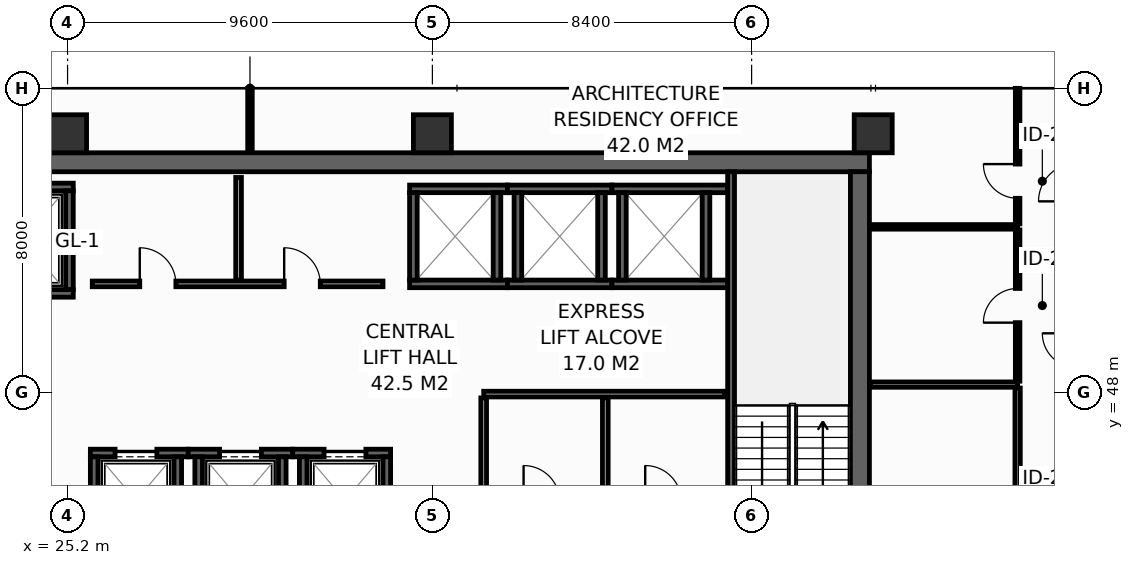
"""IFC4 building model, lengths in metres.
Left out: names, types, materials, properties, quantities, classifications, styles, units other than length and angle.
Written with IfcOpenShell. Run it as: python <this file> out.ifc"""

import sys

from ifc_helpers import new_model, si_unit, direction, frame, frame_2d, origin, origin_2d, place, context, subcontext, project, spatial, rectangle, hollow_rectangle, extrude, element, fill, save


model = new_model("IFC4")
c1 = context("Model", 3, precision=1e-05, world=origin(), true_north=direction((0.0, 1.0)))
c2 = subcontext(c1, "Body", "Model", "MODEL_VIEW")
j1 = project(units=[si_unit("LENGTHUNIT", "METRE"), si_unit("PLANEANGLEUNIT", "RADIAN")], contexts=[c1])
p1 = place(None, origin())
s1 = spatial("IfcSite", under=j1, at=p1, CompositionType="ELEMENT")
p2 = place(p1, origin())
s2 = spatial("IfcBuilding", under=s1, at=p2, CompositionType="ELEMENT")
p3 = place(p2, frame((0.0, 0.0, 163.8)))
s3 = spatial("IfcBuildingStorey", under=s2, at=p3, CompositionType="ELEMENT", Elevation=163.8)
p4 = place(p3, frame((13.6, 54.05, 0.0), z_axis=(0.0, 0.0, 1.0), x_axis=(1.0, 0.0, 0.0)))
e1 = element("IfcWall", 1, at=p4, inside=s3, PredefinedType="SHEAR", context=c2, shape_type="SweptSolid", body=[
    extrude(rectangle(XDim=32.7, YDim=0.5, at=frame_2d((16.35, 0.0))), origin(), (0.0, 0.0, 1.0), 3.55),
])
p5 = place(p3, frame((46.05, 43.4, 0.0), z_axis=(0.0, 0.0, 1.0), x_axis=(0.0, 1.0, 0.0)))
e2 = element("IfcWall", 2, at=p5, inside=s3, PredefinedType="SHEAR", context=c2, shape_type="SweptSolid", body=[
    extrude(rectangle(XDim=10.4, YDim=0.5, at=frame_2d((5.2, 0.0))), origin(), (0.0, 0.0, 1.0), 3.55),
])
for number, where, z_axis, x_axis in (
    (3, (25.2, 54.8, 0.0), (0.0, 0.0, 1.0), (1.0, 0.0, 0.0)),
    (4, (34.8, 54.8, 0.0), (0.0, 0.0, 1.0), (1.0, 0.0, 0.0)),
    (5, (46.4, 54.8, 0.0), (0.0, 0.0, 1.0), (1.0, 0.0, 0.0)),
):
    element("IfcColumn", number, at=place(p3, frame(where, z_axis=z_axis, x_axis=x_axis)), inside=s3, PredefinedType="COLUMN", context=c2, shape_type="SweptSolid", body=[
        extrude(hollow_rectangle(XDim=1.0, YDim=1.0, WallThickness=0.045, at=origin_2d()), origin(), (0.0, 0.0, 1.0), 3.8),
    ])
p6 = place(p3, frame((22.5, 50.6, 0.0), z_axis=(0.0, 0.0, 1.0), x_axis=(1.0, 0.0, 0.0)))
e6 = element("IfcWall", 6, at=p6, inside=s3, PredefinedType="SHEAR", context=c2, shape_type="SweptSolid", body=[
    extrude(rectangle(XDim=2.85, YDim=0.2, at=frame_2d((1.425, 0.0))), origin(), (0.0, 0.0, 1.0), 3.55),
])
p7 = place(p6, frame((0.925, 0.0, 0.0)))
e7 = element("IfcOpeningElement", 7, at=p7, cuts=e6, PredefinedType="OPENING", context=c2, shape_type="SweptSolid", body=[
    extrude(rectangle(XDim=1.25, YDim=2.3, at=frame_2d((0.625, 1.15))), frame((0.0, 0.11, 0.0), z_axis=(0.0, -1.0, 0.0), x_axis=(1.0, 0.0, 0.0)), (0.0, 0.0, 1.0), 0.22),
])
p8 = place(p3, frame((22.5, 53.4, 0.0), z_axis=(0.0, 0.0, 1.0), x_axis=(1.0, 0.0, 0.0)))
e8 = element("IfcWall", 8, at=p8, inside=s3, PredefinedType="SHEAR", context=c2, shape_type="SweptSolid", body=[
    extrude(rectangle(XDim=2.85, YDim=0.2, at=frame_2d((1.425, 0.0))), origin(), (0.0, 0.0, 1.0), 3.55),
])
p9 = place(p3, frame((25.25, 50.7, 0.0), z_axis=(0.0, 0.0, 1.0), x_axis=(0.0, 1.0, 0.0)))
e9 = element("IfcWall", 9, at=p9, inside=s3, PredefinedType="SHEAR", context=c2, shape_type="SweptSolid", body=[
    extrude(rectangle(XDim=2.6, YDim=0.2, at=frame_2d((1.3, 0.0))), origin(), (0.0, 0.0, 1.0), 3.55),
])
p10 = place(p3, frame((25.8, 46.4, 0.0), z_axis=(0.0, 0.0, 1.0), x_axis=(1.0, 0.0, 0.0)))
e10 = element("IfcWall", 10, at=p10, inside=s3, PredefinedType="SHEAR", context=c2, shape_type="SweptSolid", body=[
    extrude(rectangle(XDim=2.575, YDim=0.2, at=frame_2d((1.288, 0.0))), origin(), (0.0, 0.0, 1.0), 3.55),
])
p11 = place(p10, frame((0.65, 0.0, 0.0)))
e11 = element("IfcOpeningElement", 11, at=p11, cuts=e10, PredefinedType="OPENING", context=c2, shape_type="SweptSolid", body=[
    extrude(rectangle(XDim=1.1, YDim=2.2, at=frame_2d((0.55, 1.1))), frame((0.0, 0.11, 0.0), z_axis=(0.0, -1.0, 0.0), x_axis=(1.0, 0.0, 0.0)), (0.0, 0.0, 1.0), 0.22),
])
for number, where, z_axis, x_axis in (
    (12, (25.9, 44.0, 0.0), (0.0, 0.0, 1.0), (0.0, 1.0, 0.0)),
    (13, (28.1, 44.0, 0.0), (0.0, 0.0, 1.0), (0.0, 1.0, 0.0)),
):
    element("IfcWall", number, at=place(p3, frame(where, z_axis=z_axis, x_axis=x_axis)), inside=s3, PredefinedType="SHEAR", context=c2, shape_type="SweptSolid", body=[
        extrude(rectangle(XDim=2.3, YDim=0.2, at=frame_2d((1.15, 0.0))), origin(), (0.0, 0.0, 1.0), 3.55),
    ])
p12 = place(p3, frame((28.375, 46.4, 0.0), z_axis=(0.0, 0.0, 1.0), x_axis=(1.0, 0.0, 0.0)))
e14 = element("IfcWall", 14, at=p12, inside=s3, PredefinedType="SHEAR", context=c2, shape_type="SweptSolid", body=[
    extrude(rectangle(XDim=2.75, YDim=0.2, at=frame_2d((1.375, 0.0))), origin(), (0.0, 0.0, 1.0), 3.55),
])
p13 = place(p12, frame((0.825, 0.0, 0.0)))
e15 = element("IfcOpeningElement", 15, at=p13, cuts=e14, PredefinedType="OPENING", context=c2, shape_type="SweptSolid", body=[
    extrude(rectangle(XDim=1.1, YDim=2.2, at=frame_2d((0.55, 1.1))), frame((0.0, 0.11, 0.0), z_axis=(0.0, -1.0, 0.0), x_axis=(1.0, 0.0, 0.0)), (0.0, 0.0, 1.0), 0.22),
])
for number, where, z_axis, x_axis in (
    (16, (28.65, 44.0, 0.0), (0.0, 0.0, 1.0), (0.0, 1.0, 0.0)),
    (17, (30.85, 44.0, 0.0), (0.0, 0.0, 1.0), (0.0, 1.0, 0.0)),
):
    element("IfcWall", number, at=place(p3, frame(where, z_axis=z_axis, x_axis=x_axis)), inside=s3, PredefinedType="SHEAR", context=c2, shape_type="SweptSolid", body=[
        extrude(rectangle(XDim=2.3, YDim=0.2, at=frame_2d((1.15, 0.0))), origin(), (0.0, 0.0, 1.0), 3.55),
    ])
p14 = place(p3, frame((31.125, 46.4, 0.0), z_axis=(0.0, 0.0, 1.0), x_axis=(1.0, 0.0, 0.0)))
e18 = element("IfcWall", 18, at=p14, inside=s3, PredefinedType="SHEAR", context=c2, shape_type="SweptSolid", body=[
    extrude(rectangle(XDim=2.575, YDim=0.2, at=frame_2d((1.288, 0.0))), origin(), (0.0, 0.0, 1.0), 3.55),
])
p15 = place(p14, frame((0.825, 0.0, 0.0)))
e19 = element("IfcOpeningElement", 19, at=p15, cuts=e18, PredefinedType="OPENING", context=c2, shape_type="SweptSolid", body=[
    extrude(rectangle(XDim=1.1, YDim=2.2, at=frame_2d((0.55, 1.1))), frame((0.0, 0.11, 0.0), z_axis=(0.0, -1.0, 0.0), x_axis=(1.0, 0.0, 0.0)), (0.0, 0.0, 1.0), 0.22),
])
for number, where, z_axis, x_axis in (
    (20, (31.4, 44.0, 0.0), (0.0, 0.0, 1.0), (0.0, 1.0, 0.0)),
    (21, (33.6, 44.0, 0.0), (0.0, 0.0, 1.0), (0.0, 1.0, 0.0)),
):
    element("IfcWall", number, at=place(p3, frame(where, z_axis=z_axis, x_axis=x_axis)), inside=s3, PredefinedType="SHEAR", context=c2, shape_type="SweptSolid", body=[
        extrude(rectangle(XDim=2.3, YDim=0.2, at=frame_2d((1.15, 0.0))), origin(), (0.0, 0.0, 1.0), 3.55),
    ])
for number, where, z_axis, x_axis in (
    (22, (34.2, 50.85, 0.0), (0.0, 0.0, 1.0), (1.0, 0.0, 0.0)),
    (23, (34.2, 53.35, 0.0), (0.0, 0.0, 1.0), (1.0, 0.0, 0.0)),
):
    element("IfcWall", number, at=place(p3, frame(where, z_axis=z_axis, x_axis=x_axis)), inside=s3, PredefinedType="SHEAR", context=c2, shape_type="SweptSolid", body=[
        extrude(rectangle(XDim=2.575, YDim=0.2, at=frame_2d((1.288, 0.0))), origin(), (0.0, 0.0, 1.0), 3.55),
    ])
for number, where, z_axis, x_axis in (
    (24, (34.3, 50.95, 0.0), (0.0, 0.0, 1.0), (0.0, 1.0, 0.0)),
    (25, (36.5, 50.95, 0.0), (0.0, 0.0, 1.0), (0.0, 1.0, 0.0)),
):
    element("IfcWall", number, at=place(p3, frame(where, z_axis=z_axis, x_axis=x_axis)), inside=s3, PredefinedType="SHEAR", context=c2, shape_type="SweptSolid", body=[
        extrude(rectangle(XDim=2.3, YDim=0.2, at=frame_2d((1.15, 0.0))), origin(), (0.0, 0.0, 1.0), 3.55),
    ])
for number, where, z_axis, x_axis in (
    (26, (36.775, 50.85, 0.0), (0.0, 0.0, 1.0), (1.0, 0.0, 0.0)),
    (27, (36.775, 53.35, 0.0), (0.0, 0.0, 1.0), (1.0, 0.0, 0.0)),
):
    element("IfcWall", number, at=place(p3, frame(where, z_axis=z_axis, x_axis=x_axis)), inside=s3, PredefinedType="SHEAR", context=c2, shape_type="SweptSolid", body=[
        extrude(rectangle(XDim=2.75, YDim=0.2, at=frame_2d((1.375, 0.0))), origin(), (0.0, 0.0, 1.0), 3.55),
    ])
for number, where, z_axis, x_axis in (
    (28, (37.05, 50.95, 0.0), (0.0, 0.0, 1.0), (0.0, 1.0, 0.0)),
    (29, (39.25, 50.95, 0.0), (0.0, 0.0, 1.0), (0.0, 1.0, 0.0)),
):
    element("IfcWall", number, at=place(p3, frame(where, z_axis=z_axis, x_axis=x_axis)), inside=s3, PredefinedType="SHEAR", context=c2, shape_type="SweptSolid", body=[
        extrude(rectangle(XDim=2.3, YDim=0.2, at=frame_2d((1.15, 0.0))), origin(), (0.0, 0.0, 1.0), 3.55),
    ])
for number, where, z_axis, x_axis in (
    (30, (39.525, 50.85, 0.0), (0.0, 0.0, 1.0), (1.0, 0.0, 0.0)),
    (31, (39.525, 53.35, 0.0), (0.0, 0.0, 1.0), (1.0, 0.0, 0.0)),
):
    element("IfcWall", number, at=place(p3, frame(where, z_axis=z_axis, x_axis=x_axis)), inside=s3, PredefinedType="SHEAR", context=c2, shape_type="SweptSolid", body=[
        extrude(rectangle(XDim=3.045, YDim=0.2, at=frame_2d((1.522, 0.0))), origin(), (0.0, 0.0, 1.0), 3.55),
    ])
for number, where, z_axis, x_axis in (
    (32, (39.8, 50.95, 0.0), (0.0, 0.0, 1.0), (0.0, 1.0, 0.0)),
    (33, (42.0, 50.95, 0.0), (0.0, 0.0, 1.0), (0.0, 1.0, 0.0)),
):
    element("IfcWall", number, at=place(p3, frame(where, z_axis=z_axis, x_axis=x_axis)), inside=s3, PredefinedType="SHEAR", context=c2, shape_type="SweptSolid", body=[
        extrude(rectangle(XDim=2.3, YDim=0.2, at=frame_2d((1.15, 0.0))), origin(), (0.0, 0.0, 1.0), 3.55),
    ])
p16 = place(p3, frame((42.66, 53.8, 0.0), z_axis=(0.0, 0.0, 1.0), x_axis=(0.0, -1.0, 0.0)))
e34 = element("IfcWall", 34, at=p16, inside=s3, PredefinedType="SHEAR", context=c2, shape_type="SweptSolid", body=[
    extrude(rectangle(XDim=10.4, YDim=0.18, at=frame_2d((5.2, 0.0))), origin(), (0.0, 0.0, 1.0), 3.55),
])
p17 = place(p16, frame((8.99, 0.0, 0.0)))
e35 = element("IfcOpeningElement", 35, at=p17, cuts=e34, PredefinedType="OPENING", context=c2, shape_type="SweptSolid", body=[
    extrude(rectangle(XDim=1.1, YDim=2.15, at=frame_2d((0.55, 1.075))), frame((0.0, 0.1, 0.0), z_axis=(0.0, -1.0, 0.0), x_axis=(1.0, 0.0, 0.0)), (0.0, 0.0, 1.0), 0.2),
])
p18 = place(p3, frame((36.15, 47.95, 0.0), z_axis=(0.0, 0.0, 1.0), x_axis=(1.0, 0.0, 0.0)))
e36 = element("IfcWall", 36, at=p18, inside=s3, PredefinedType="PARTITIONING", context=c2, shape_type="SweptSolid", body=[
    extrude(rectangle(XDim=6.35, YDim=0.15, at=frame_2d((3.175, 0.0))), origin(), (0.0, 0.0, 1.0), 3.55),
])
for number, where, z_axis, x_axis in (
    (37, (36.15, 45.22, 0.0), (0.0, 0.0, 1.0), (0.0, 1.0, 0.0)),
    (38, (39.35, 45.22, 0.0), (0.0, 0.0, 1.0), (0.0, 1.0, 0.0)),
):
    element("IfcWall", number, at=place(p3, frame(where, z_axis=z_axis, x_axis=x_axis)), inside=s3, PredefinedType="PARTITIONING", context=c2, shape_type="SweptSolid", body=[
        extrude(rectangle(XDim=2.63, YDim=0.15, at=frame_2d((1.315, 0.0))), origin(), (0.0, 0.0, 1.0), 3.55),
    ])
p19 = place(p3, frame((25.85, 50.85, 0.0), z_axis=(0.0, 0.0, 1.0), x_axis=(1.0, 0.0, 0.0)))
e39 = element("IfcWall", 39, at=p19, inside=s3, PredefinedType="PARTITIONING", context=c2, shape_type="SweptSolid", body=[
    extrude(rectangle(XDim=7.65, YDim=0.15, at=frame_2d((3.825, 0.0))), origin(), (0.0, 0.0, 1.0), 3.55),
])
p20 = place(p19, frame((1.25, 0.0, 0.0)))
e40 = element("IfcOpeningElement", 40, at=p20, cuts=e39, PredefinedType="OPENING", context=c2, shape_type="SweptSolid", body=[
    extrude(rectangle(XDim=0.95, YDim=2.15, at=frame_2d((0.475, 1.075))), frame((0.0, 0.085, 0.0), z_axis=(0.0, -1.0, 0.0), x_axis=(1.0, 0.0, 0.0)), (0.0, 0.0, 1.0), 0.17),
])
p21 = place(p19, frame((5.05, 0.0, 0.0)))
e41 = element("IfcOpeningElement", 41, at=p21, cuts=e39, PredefinedType="OPENING", context=c2, shape_type="SweptSolid", body=[
    extrude(rectangle(XDim=0.95, YDim=2.15, at=frame_2d((0.475, 1.075))), frame((0.0, 0.085, 0.0), z_axis=(0.0, -1.0, 0.0), x_axis=(1.0, 0.0, 0.0)), (0.0, 0.0, 1.0), 0.17),
])
p22 = place(p3, frame((29.7, 50.95, 0.0), z_axis=(0.0, 0.0, 1.0), x_axis=(0.0, 1.0, 0.0)))
e42 = element("IfcWall", 42, at=p22, inside=s3, PredefinedType="PARTITIONING", context=c2, shape_type="SweptSolid", body=[
    extrude(rectangle(XDim=2.7, YDim=0.15, at=frame_2d((1.35, 0.0))), origin(), (0.0, 0.0, 1.0), 3.55),
])
p23 = place(p3, frame((46.32, 48.2, 0.0), z_axis=(0.0, 0.0, 1.0), x_axis=(1.0, 0.0, 0.0)))
e43 = element("IfcWall", 43, at=p23, inside=s3, PredefinedType="PARTITIONING", context=c2, shape_type="SweptSolid", body=[
    extrude(rectangle(XDim=3.88, YDim=0.14, at=frame_2d((1.94, 0.0))), origin(), (0.0, 0.0, 1.0), 3.55),
])
p24 = place(p3, frame((50.2, 40.94, 0.0), z_axis=(0.0, 0.0, 1.0), x_axis=(0.0, 1.0, 0.0)))
e44 = element("IfcWall", 44, at=p24, inside=s3, PredefinedType="PARTITIONING", context=c2, shape_type="SweptSolid", body=[
    extrude(rectangle(XDim=7.17, YDim=0.14, at=frame_2d((3.585, 0.0))), origin(), (0.0, 0.0, 1.0), 2.835),
])
p25 = place(p24, frame((3.135, 0.0, 0.0)))
e45 = element("IfcOpeningElement", 45, at=p25, cuts=e44, PredefinedType="OPENING", context=c2, shape_type="SweptSolid", body=[
    extrude(rectangle(XDim=0.9, YDim=2.1, at=frame_2d((0.45, 1.05))), frame((0.0, 0.08, 0.0), z_axis=(0.0, -1.0, 0.0), x_axis=(1.0, 0.0, 0.0)), (0.0, 0.0, 1.0), 0.16),
])
p26 = place(p3, frame((46.32, 52.35, 0.0), z_axis=(0.0, 0.0, 1.0), x_axis=(1.0, 0.0, 0.0)))
e46 = element("IfcWall", 46, at=p26, inside=s3, PredefinedType="PARTITIONING", context=c2, shape_type="SweptSolid", body=[
    extrude(rectangle(XDim=3.88, YDim=0.12, at=frame_2d((1.94, 0.0))), origin(), (0.0, 0.0, 1.0), 3.55),
])
p27 = place(p3, frame((30.0, 54.32, 0.0), z_axis=(0.0, 0.0, 1.0), x_axis=(0.0, 1.0, 0.0)))
e47 = element("IfcWall", 47, at=p27, inside=s3, PredefinedType="PARTITIONING", context=c2, shape_type="SweptSolid", body=[
    extrude(rectangle(XDim=1.675, YDim=0.12, at=frame_2d((0.837, 0.0))), origin(), (0.0, 0.0, 1.0), 2.935),
])
p28 = place(p3, frame((50.2, 48.29, 0.0), z_axis=(0.0, 0.0, 1.0), x_axis=(0.0, 1.0, 0.0)))
e48 = element("IfcWall", 48, at=p28, inside=s3, PredefinedType="PARTITIONING", context=c2, shape_type="SweptSolid", body=[
    extrude(rectangle(XDim=3.98, YDim=0.12, at=frame_2d((1.99, 0.0))), origin(), (0.0, 0.0, 1.0), 3.55),
])
p29 = place(p28, frame((1.54, 0.0, 0.0)))
e49 = element("IfcOpeningElement", 49, at=p29, cuts=e48, PredefinedType="OPENING", context=c2, shape_type="SweptSolid", body=[
    extrude(rectangle(XDim=0.9, YDim=2.1, at=frame_2d((0.45, 1.05))), frame((0.0, 0.07, 0.0), z_axis=(0.0, -1.0, 0.0), x_axis=(1.0, 0.0, 0.0)), (0.0, 0.0, 1.0), 0.14),
])
p30 = place(p3, frame((50.2, 52.43, 0.0), z_axis=(0.0, 0.0, 1.0), x_axis=(0.0, 1.0, 0.0)))
e50 = element("IfcWall", 50, at=p30, inside=s3, PredefinedType="PARTITIONING", context=c2, shape_type="SweptSolid", body=[
    extrude(rectangle(XDim=3.565, YDim=0.12, at=frame_2d((1.783, 0.0))), origin(), (0.0, 0.0, 1.0), 2.935),
])
p31 = place(p30, frame((0.672, 0.0, 0.0)))
e51 = element("IfcOpeningElement", 51, at=p31, cuts=e50, PredefinedType="OPENING", context=c2, shape_type="SweptSolid", body=[
    extrude(rectangle(XDim=0.9, YDim=2.1, at=frame_2d((0.45, 1.05))), frame((0.0, 0.07, 0.0), z_axis=(0.0, -1.0, 0.0), x_axis=(1.0, 0.0, 0.0)), (0.0, 0.0, 1.0), 0.14),
])
p32 = place(p11, origin())
e52 = element("IfcDoor", 52, at=p32, inside=s3, OperationType="SLIDING_TO_LEFT", PredefinedType="DOOR", context=c2, shape_type="SweptSolid", body=[
    extrude(rectangle(XDim=1.1, YDim=2.2, at=frame_2d((0.55, 1.1))), frame((0.0, 0.025, 0.0), z_axis=(0.0, -1.0, 0.0), x_axis=(1.0, 0.0, 0.0)), (0.0, 0.0, 1.0), 0.05),
])
fill(e11, e52)
p33 = place(p13, origin())
e53 = element("IfcDoor", 53, at=p33, inside=s3, OperationType="SLIDING_TO_LEFT", PredefinedType="DOOR", context=c2, shape_type="SweptSolid", body=[
    extrude(rectangle(XDim=1.1, YDim=2.2, at=frame_2d((0.55, 1.1))), frame((0.0, 0.025, 0.0), z_axis=(0.0, -1.0, 0.0), x_axis=(1.0, 0.0, 0.0)), (0.0, 0.0, 1.0), 0.05),
])
fill(e15, e53)
p34 = place(p15, origin())
e54 = element("IfcDoor", 54, at=p34, inside=s3, OperationType="SLIDING_TO_LEFT", PredefinedType="DOOR", context=c2, shape_type="SweptSolid", body=[
    extrude(rectangle(XDim=1.1, YDim=2.2, at=frame_2d((0.55, 1.1))), frame((0.0, 0.025, 0.0), z_axis=(0.0, -1.0, 0.0), x_axis=(1.0, 0.0, 0.0)), (0.0, 0.0, 1.0), 0.05),
])
fill(e19, e54)
p35 = place(p20, origin())
e55 = element("IfcDoor", 55, at=p35, inside=s3, OperationType="SINGLE_SWING_LEFT", PredefinedType="DOOR", context=c2, shape_type="SweptSolid", body=[
    extrude(rectangle(XDim=0.95, YDim=2.15, at=frame_2d((0.475, 1.075))), frame((0.0, 0.025, 0.0), z_axis=(0.0, -1.0, 0.0), x_axis=(1.0, 0.0, 0.0)), (0.0, 0.0, 1.0), 0.05),
])
fill(e40, e55)
p36 = place(p21, origin())
e56 = element("IfcDoor", 56, at=p36, inside=s3, OperationType="SINGLE_SWING_LEFT", PredefinedType="DOOR", context=c2, shape_type="SweptSolid", body=[
    extrude(rectangle(XDim=0.95, YDim=2.15, at=frame_2d((0.475, 1.075))), frame((0.0, 0.025, 0.0), z_axis=(0.0, -1.0, 0.0), x_axis=(1.0, 0.0, 0.0)), (0.0, 0.0, 1.0), 0.05),
])
fill(e41, e56)
p37 = place(p29, origin())
e57 = element("IfcDoor", 57, at=p37, inside=s3, OperationType="SINGLE_SWING_LEFT", PredefinedType="DOOR", context=c2, shape_type="SweptSolid", body=[
    extrude(rectangle(XDim=0.9, YDim=2.1, at=frame_2d((0.45, 1.05))), frame((0.0, 0.025, 0.0), z_axis=(0.0, -1.0, 0.0), x_axis=(1.0, 0.0, 0.0)), (0.0, 0.0, 1.0), 0.05),
])
fill(e49, e57)
p38 = place(p31, origin())
e58 = element("IfcDoor", 58, at=p38, inside=s3, OperationType="SINGLE_SWING_RIGHT", PredefinedType="DOOR", context=c2, shape_type="SweptSolid", body=[
    extrude(rectangle(XDim=0.9, YDim=2.1, at=frame_2d((0.45, 1.05))), frame((0.0, 0.025, 0.0), z_axis=(0.0, -1.0, 0.0), x_axis=(1.0, 0.0, 0.0)), (0.0, 0.0, 1.0), 0.05),
])
fill(e51, e58)
save(model, sys.argv[1])
